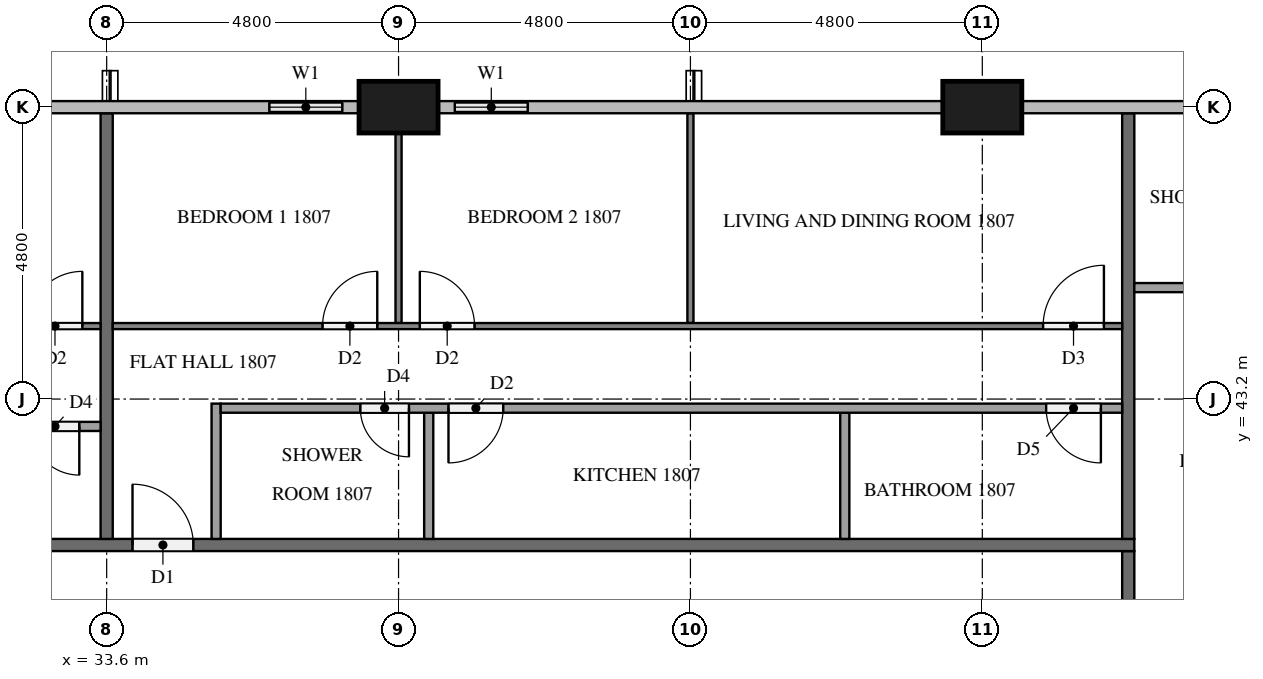
"""IFC4 building model, lengths in metres.
Left out: names, types, materials, properties, quantities, classifications, styles, units other than length and angle.
Written with IfcOpenShell. Run it as: python <this file> out.ifc"""

import sys

from ifc_helpers import new_model, si_unit, direction, frame, frame_2d, origin, origin_2d, place, context, subcontext, project, spatial, rectangle, extrude, element, fill, save


model = new_model("IFC4")
c1 = context("Model", 3, precision=1e-05, world=origin(), true_north=direction((0.0, 1.0)))
c2 = subcontext(c1, "Body", "Model", "MODEL_VIEW")
j1 = project(units=[si_unit("LENGTHUNIT", "METRE"), si_unit("PLANEANGLEUNIT", "RADIAN")], contexts=[c1])
p1 = place(None, origin())
s1 = spatial("IfcSite", under=j1, at=p1, CompositionType="ELEMENT")
p2 = place(p1, origin())
s2 = spatial("IfcBuilding", under=s1, at=p2, CompositionType="ELEMENT")
p3 = place(p2, frame((0.0, 0.0, 73.3)))
s3 = spatial("IfcBuildingStorey", under=s2, at=p3, CompositionType="ELEMENT", Elevation=73.3)
for number, where, z_axis, x_axis in (
    (1, (48.0, 48.0, 0.0), (0.0, 0.0, 1.0), (1.0, 0.0, 0.0)),
    (2, (38.4, 48.0, 0.0), (0.0, 0.0, 1.0), (1.0, 0.0, 0.0)),
):
    element("IfcColumn", number, at=place(p3, frame(where, z_axis=z_axis, x_axis=x_axis)), inside=s3, PredefinedType="COLUMN", context=c2, shape_type="SweptSolid", body=[
        extrude(rectangle(XDim=1.3, YDim=0.85, at=origin_2d()), origin(), (0.0, 0.0, 1.0), 3.2),
    ])
p4 = place(p3, frame((40.8, 48.0, 0.0), z_axis=(0.0, 0.0, 1.0), x_axis=(-1.0, 0.0, 0.0)))
e3 = element("IfcWall", 3, at=p4, inside=s3, PredefinedType="SOLIDWALL", context=c2, shape_type="SweptSolid", body=[
    extrude(rectangle(XDim=1.75, YDim=0.15, at=frame_2d((0.875, 0.0))), origin(), (0.0, 0.0, 1.0), 3.2),
])
p5 = place(p4, frame((0.275, 0.0, 0.9)))
e4 = element("IfcOpeningElement", 4, at=p5, cuts=e3, PredefinedType="OPENING", context=c2, shape_type="SweptSolid", body=[
    extrude(rectangle(XDim=1.2, YDim=1.4, at=frame_2d((0.6, 0.7))), frame((0.0, 0.085, 0.0), z_axis=(0.0, -1.0, 0.0), x_axis=(1.0, 0.0, 0.0)), (0.0, 0.0, 1.0), 0.17),
])
p6 = place(p3, frame((37.75, 48.0, 0.0), z_axis=(0.0, 0.0, 1.0), x_axis=(-1.0, 0.0, 0.0)))
e5 = element("IfcWall", 5, at=p6, inside=s3, PredefinedType="SOLIDWALL", context=c2, shape_type="SweptSolid", body=[
    extrude(rectangle(XDim=1.75, YDim=0.15, at=frame_2d((0.875, 0.0))), origin(), (0.0, 0.0, 1.0), 3.2),
])
p7 = place(p6, frame((0.275, 0.0, 0.9)))
e6 = element("IfcOpeningElement", 6, at=p7, cuts=e5, PredefinedType="OPENING", context=c2, shape_type="SweptSolid", body=[
    extrude(rectangle(XDim=1.2, YDim=1.4, at=frame_2d((0.6, 0.7))), frame((0.0, 0.085, 0.0), z_axis=(0.0, -1.0, 0.0), x_axis=(1.0, 0.0, 0.0)), (0.0, 0.0, 1.0), 0.17),
])
p8 = place(p3, frame((50.4, 40.7, 0.0), z_axis=(0.0, 0.0, 1.0), x_axis=(0.0, -1.0, 0.0)))
e7 = element("IfcWall", 7, at=p8, inside=s3, PredefinedType="PARTITIONING", context=c2, shape_type="SweptSolid", body=[
    extrude(rectangle(XDim=28.6, YDim=0.2, at=frame_2d((14.3, 0.0))), origin(), (0.0, 0.0, 1.0), 3.2),
])
p9 = place(p8, frame((21.875, 0.0, 0.0)))
e8 = element("IfcOpeningElement", 8, at=p9, cuts=e7, PredefinedType="OPENING", context=c2, shape_type="SweptSolid", body=[
    extrude(rectangle(XDim=1.1, YDim=2.1, at=frame_2d((0.55, 1.05))), frame((0.0, 0.11, 0.0), z_axis=(0.0, -1.0, 0.0), x_axis=(1.0, 0.0, 0.0)), (0.0, 0.0, 1.0), 0.22),
])
p10 = place(p8, frame((20.075, 0.0, 0.0)))
e9 = element("IfcOpeningElement", 9, at=p10, cuts=e7, PredefinedType="OPENING", context=c2, shape_type="SweptSolid", body=[
    extrude(rectangle(XDim=1.0, YDim=2.1, at=frame_2d((0.5, 1.05))), frame((0.0, 0.11, 0.0), z_axis=(0.0, -1.0, 0.0), x_axis=(1.0, 0.0, 0.0)), (0.0, 0.0, 1.0), 0.22),
])
p11 = place(p8, frame((5.675, 0.0, 0.0)))
e10 = element("IfcOpeningElement", 10, at=p11, cuts=e7, PredefinedType="OPENING", context=c2, shape_type="SweptSolid", body=[
    extrude(rectangle(XDim=1.0, YDim=2.1, at=frame_2d((0.5, 1.05))), frame((0.0, 0.11, 0.0), z_axis=(0.0, -1.0, 0.0), x_axis=(1.0, 0.0, 0.0)), (0.0, 0.0, 1.0), 0.22),
])
p12 = place(p3, frame((11.9, 40.8, 0.0), z_axis=(0.0, 0.0, 1.0), x_axis=(1.0, 0.0, 0.0)))
e11 = element("IfcWall", 11, at=p12, inside=s3, PredefinedType="PARTITIONING", context=c2, shape_type="SweptSolid", body=[
    extrude(rectangle(XDim=38.6, YDim=0.2, at=frame_2d((19.3, 0.0))), origin(), (0.0, 0.0, 1.0), 3.2),
])
p13 = place(p12, frame((22.125, 0.0, 0.0)))
e12 = element("IfcOpeningElement", 12, at=p13, cuts=e11, PredefinedType="OPENING", context=c2, shape_type="SweptSolid", body=[
    extrude(rectangle(XDim=1.0, YDim=2.1, at=frame_2d((0.5, 1.05))), frame((0.0, 0.11, 0.0), z_axis=(0.0, -1.0, 0.0), x_axis=(1.0, 0.0, 0.0)), (0.0, 0.0, 1.0), 0.22),
])
p14 = place(p12, frame((7.725, 0.0, 0.0)))
e13 = element("IfcOpeningElement", 13, at=p14, cuts=e11, PredefinedType="OPENING", context=c2, shape_type="SweptSolid", body=[
    extrude(rectangle(XDim=1.0, YDim=2.1, at=frame_2d((0.5, 1.05))), frame((0.0, 0.11, 0.0), z_axis=(0.0, -1.0, 0.0), x_axis=(1.0, 0.0, 0.0)), (0.0, 0.0, 1.0), 0.22),
])
p15 = place(p12, frame((5.875, 0.0, 0.0)))
e14 = element("IfcOpeningElement", 14, at=p15, cuts=e11, PredefinedType="OPENING", context=c2, shape_type="SweptSolid", body=[
    extrude(rectangle(XDim=1.0, YDim=2.1, at=frame_2d((0.5, 1.05))), frame((0.0, 0.11, 0.0), z_axis=(0.0, -1.0, 0.0), x_axis=(1.0, 0.0, 0.0)), (0.0, 0.0, 1.0), 0.22),
])
for number, where, z_axis, x_axis in (
    (15, (50.4, 40.9, 0.0), (0.0, 0.0, 1.0), (0.0, 1.0, 0.0)),
    (16, (33.6, 47.9, 0.0), (0.0, 0.0, 1.0), (0.0, -1.0, 0.0)),
):
    element("IfcWall", number, at=place(p3, frame(where, z_axis=z_axis, x_axis=x_axis)), inside=s3, PredefinedType="PARTITIONING", context=c2, shape_type="SweptSolid", body=[
        extrude(rectangle(XDim=7.0, YDim=0.2, at=frame_2d((3.5, 0.0))), origin(), (0.0, 0.0, 1.0), 3.2),
    ])
p16 = place(p3, frame((50.5, 45.033, 0.0), z_axis=(0.0, 0.0, 1.0), x_axis=(1.0, 0.0, 0.0)))
e17 = element("IfcWall", 17, at=p16, inside=s3, PredefinedType="PARTITIONING", context=c2, shape_type="SweptSolid", body=[
    extrude(rectangle(XDim=3.575, YDim=0.15, at=frame_2d((1.788, 0.0))), origin(), (0.0, 0.0, 1.0), 3.2),
])
p17 = place(p3, frame((38.4, 44.45, 0.0), z_axis=(0.0, 0.0, 1.0), x_axis=(0.0, 1.0, 0.0)))
e18 = element("IfcWall", 18, at=p17, inside=s3, PredefinedType="PARTITIONING", context=c2, shape_type="SweptSolid", body=[
    extrude(rectangle(XDim=3.125, YDim=0.1, at=frame_2d((1.562, 0.0))), origin(), (0.0, 0.0, 1.0), 3.2),
])
p18 = place(p3, frame((43.2, 44.45, 0.0), z_axis=(0.0, 0.0, 1.0), x_axis=(0.0, 1.0, 0.0)))
e19 = element("IfcWall", 19, at=p18, inside=s3, PredefinedType="PARTITIONING", context=c2, shape_type="SweptSolid", body=[
    extrude(rectangle(XDim=3.45, YDim=0.1, at=frame_2d((1.725, 0.0))), origin(), (0.0, 0.0, 1.0), 3.2),
])
p19 = place(p3, frame((33.7, 44.4, 0.0), z_axis=(0.0, 0.0, 1.0), x_axis=(1.0, 0.0, 0.0)))
e20 = element("IfcWall", 20, at=p19, inside=s3, PredefinedType="PARTITIONING", context=c2, shape_type="SweptSolid", body=[
    extrude(rectangle(XDim=16.6, YDim=0.1, at=frame_2d((8.3, 0.0))), origin(), (0.0, 0.0, 1.0), 3.2),
])
p20 = place(p19, frame((3.45, 0.0, 0.0)))
e21 = element("IfcOpeningElement", 21, at=p20, cuts=e20, PredefinedType="OPENING", context=c2, shape_type="SweptSolid", body=[
    extrude(rectangle(XDim=0.9, YDim=2.1, at=frame_2d((0.45, 1.05))), frame((0.0, 0.06, 0.0), z_axis=(0.0, -1.0, 0.0), x_axis=(1.0, 0.0, 0.0)), (0.0, 0.0, 1.0), 0.12),
])
p21 = place(p19, frame((5.05, 0.0, 0.0)))
e22 = element("IfcOpeningElement", 22, at=p21, cuts=e20, PredefinedType="OPENING", context=c2, shape_type="SweptSolid", body=[
    extrude(rectangle(XDim=0.9, YDim=2.1, at=frame_2d((0.45, 1.05))), frame((0.0, 0.06, 0.0), z_axis=(0.0, -1.0, 0.0), x_axis=(1.0, 0.0, 0.0)), (0.0, 0.0, 1.0), 0.12),
])
p22 = place(p19, frame((15.3, 0.0, 0.0)))
e23 = element("IfcOpeningElement", 23, at=p22, cuts=e20, PredefinedType="OPENING", context=c2, shape_type="SweptSolid", body=[
    extrude(rectangle(XDim=1.0, YDim=2.1, at=frame_2d((0.5, 1.05))), frame((0.0, 0.06, 0.0), z_axis=(0.0, -1.0, 0.0), x_axis=(1.0, 0.0, 0.0)), (0.0, 0.0, 1.0), 0.12),
])
for number, where, z_axis, x_axis in (
    (24, (38.896, 40.9, 0.0), (0.0, 0.0, 1.0), (0.0, 1.0, 0.0)),
    (25, (45.739, 40.9, 0.0), (0.0, 0.0, 1.0), (0.0, 1.0, 0.0)),
):
    element("IfcWall", number, at=place(p3, frame(where, z_axis=z_axis, x_axis=x_axis)), inside=s3, PredefinedType="PARTITIONING", context=c2, shape_type="SweptSolid", body=[
        extrude(rectangle(XDim=2.075, YDim=0.15, at=frame_2d((1.038, 0.0))), origin(), (0.0, 0.0, 1.0), 3.2),
    ])
p23 = place(p3, frame((35.4, 40.9, 0.0), z_axis=(0.0, 0.0, 1.0), x_axis=(0.0, 1.0, 0.0)))
e26 = element("IfcWall", 26, at=p23, inside=s3, PredefinedType="PARTITIONING", context=c2, shape_type="SweptSolid", body=[
    extrude(rectangle(XDim=2.225, YDim=0.15, at=frame_2d((1.113, 0.0))), origin(), (0.0, 0.0, 1.0), 3.2),
])
p24 = place(p3, frame((50.3, 43.05, 0.0), z_axis=(0.0, 0.0, 1.0), x_axis=(-1.0, 0.0, 0.0)))
e27 = element("IfcWall", 27, at=p24, inside=s3, PredefinedType="PARTITIONING", context=c2, shape_type="SweptSolid", body=[
    extrude(rectangle(XDim=14.825, YDim=0.15, at=frame_2d((7.413, 0.0))), origin(), (0.0, 0.0, 1.0), 3.2),
])
p25 = place(p24, frame((11.729, 0.0, 0.0)))
e28 = element("IfcOpeningElement", 28, at=p25, cuts=e27, PredefinedType="OPENING", context=c2, shape_type="SweptSolid", body=[
    extrude(rectangle(XDim=0.8, YDim=2.1, at=frame_2d((0.4, 1.05))), frame((0.0, 0.085, 0.0), z_axis=(0.0, -1.0, 0.0), x_axis=(1.0, 0.0, 0.0)), (0.0, 0.0, 1.0), 0.17),
])
p26 = place(p24, frame((10.179, 0.0, 0.0)))
e29 = element("IfcOpeningElement", 29, at=p26, cuts=e27, PredefinedType="OPENING", context=c2, shape_type="SweptSolid", body=[
    extrude(rectangle(XDim=0.9, YDim=2.1, at=frame_2d((0.45, 1.05))), frame((0.0, 0.085, 0.0), z_axis=(0.0, -1.0, 0.0), x_axis=(1.0, 0.0, 0.0)), (0.0, 0.0, 1.0), 0.17),
])
p27 = place(p24, frame((0.35, 0.0, 0.0)))
e30 = element("IfcOpeningElement", 30, at=p27, cuts=e27, PredefinedType="OPENING", context=c2, shape_type="SweptSolid", body=[
    extrude(rectangle(XDim=0.9, YDim=2.1, at=frame_2d((0.45, 1.05))), frame((0.0, 0.085, 0.0), z_axis=(0.0, -1.0, 0.0), x_axis=(1.0, 0.0, 0.0)), (0.0, 0.0, 1.0), 0.17),
])
p28 = place(p3, frame((19.3, 44.4, 0.0), z_axis=(0.0, 0.0, 1.0), x_axis=(1.0, 0.0, 0.0)))
e31 = element("IfcWall", 31, at=p28, inside=s3, PredefinedType="PARTITIONING", context=c2, shape_type="SweptSolid", body=[
    extrude(rectangle(XDim=14.2, YDim=0.1, at=frame_2d((7.1, 0.0))), origin(), (0.0, 0.0, 1.0), 3.2),
])
p29 = place(p28, frame((3.45, 0.0, 0.0)))
e32 = element("IfcOpeningElement", 32, at=p29, cuts=e31, PredefinedType="OPENING", context=c2, shape_type="SweptSolid", body=[
    extrude(rectangle(XDim=0.9, YDim=2.1, at=frame_2d((0.45, 1.05))), frame((0.0, 0.06, 0.0), z_axis=(0.0, -1.0, 0.0), x_axis=(1.0, 0.0, 0.0)), (0.0, 0.0, 1.0), 0.12),
])
p30 = place(p28, frame((5.05, 0.0, 0.0)))
e33 = element("IfcOpeningElement", 33, at=p30, cuts=e31, PredefinedType="OPENING", context=c2, shape_type="SweptSolid", body=[
    extrude(rectangle(XDim=1.0, YDim=2.1, at=frame_2d((0.5, 1.05))), frame((0.0, 0.06, 0.0), z_axis=(0.0, -1.0, 0.0), x_axis=(1.0, 0.0, 0.0)), (0.0, 0.0, 1.0), 0.12),
])
p31 = place(p28, frame((13.0, 0.0, 0.0)))
e34 = element("IfcOpeningElement", 34, at=p31, cuts=e31, PredefinedType="OPENING", context=c2, shape_type="SweptSolid", body=[
    extrude(rectangle(XDim=0.9, YDim=2.1, at=frame_2d((0.45, 1.05))), frame((0.0, 0.06, 0.0), z_axis=(0.0, -1.0, 0.0), x_axis=(1.0, 0.0, 0.0)), (0.0, 0.0, 1.0), 0.12),
])
p32 = place(p3, frame((33.5, 42.75, 0.0), z_axis=(0.0, 0.0, 1.0), x_axis=(-1.0, 0.0, 0.0)))
e35 = element("IfcWall", 35, at=p32, inside=s3, PredefinedType="PARTITIONING", context=c2, shape_type="SweptSolid", body=[
    extrude(rectangle(XDim=12.425, YDim=0.15, at=frame_2d((6.212, 0.0))), origin(), (0.0, 0.0, 1.0), 3.2),
])
p33 = place(p32, frame((8.927, 0.0, 0.0)))
e36 = element("IfcOpeningElement", 36, at=p33, cuts=e35, PredefinedType="OPENING", context=c2, shape_type="SweptSolid", body=[
    extrude(rectangle(XDim=0.9, YDim=2.1, at=frame_2d((0.45, 1.05))), frame((0.0, 0.085, 0.0), z_axis=(0.0, -1.0, 0.0), x_axis=(1.0, 0.0, 0.0)), (0.0, 0.0, 1.0), 0.17),
])
p34 = place(p32, frame((7.377, 0.0, 0.0)))
e37 = element("IfcOpeningElement", 37, at=p34, cuts=e35, PredefinedType="OPENING", context=c2, shape_type="SweptSolid", body=[
    extrude(rectangle(XDim=0.9, YDim=2.1, at=frame_2d((0.45, 1.05))), frame((0.0, 0.085, 0.0), z_axis=(0.0, -1.0, 0.0), x_axis=(1.0, 0.0, 0.0)), (0.0, 0.0, 1.0), 0.17),
])
p35 = place(p32, frame((0.35, 0.0, 0.0)))
e38 = element("IfcOpeningElement", 38, at=p35, cuts=e35, PredefinedType="OPENING", context=c2, shape_type="SweptSolid", body=[
    extrude(rectangle(XDim=0.8, YDim=2.1, at=frame_2d((0.4, 1.05))), frame((0.0, 0.085, 0.0), z_axis=(0.0, -1.0, 0.0), x_axis=(1.0, 0.0, 0.0)), (0.0, 0.0, 1.0), 0.17),
])
p36 = place(p5, origin())
e39 = element("IfcWindow", 39, at=p36, inside=s3, PartitioningType="SINGLE_PANEL", PredefinedType="WINDOW", context=c2, shape_type="SweptSolid", body=[
    extrude(rectangle(XDim=1.2, YDim=1.4, at=frame_2d((0.6, 0.7))), frame((0.0, 0.03, 0.0), z_axis=(0.0, -1.0, 0.0), x_axis=(1.0, 0.0, 0.0)), (0.0, 0.0, 1.0), 0.06),
])
fill(e4, e39)
p37 = place(p7, origin())
e40 = element("IfcWindow", 40, at=p37, inside=s3, PartitioningType="SINGLE_PANEL", PredefinedType="WINDOW", context=c2, shape_type="SweptSolid", body=[
    extrude(rectangle(XDim=1.2, YDim=1.4, at=frame_2d((0.6, 0.7))), frame((0.0, 0.03, 0.0), z_axis=(0.0, -1.0, 0.0), x_axis=(1.0, 0.0, 0.0)), (0.0, 0.0, 1.0), 0.06),
])
fill(e6, e40)
p38 = place(p13, origin())
e41 = element("IfcDoor", 41, at=p38, inside=s3, OperationType="SINGLE_SWING_LEFT", PredefinedType="DOOR", context=c2, shape_type="SweptSolid", body=[
    extrude(rectangle(XDim=1.0, YDim=2.1, at=frame_2d((0.5, 1.05))), frame((0.0, 0.025, 0.0), z_axis=(0.0, -1.0, 0.0), x_axis=(1.0, 0.0, 0.0)), (0.0, 0.0, 1.0), 0.05),
])
fill(e12, e41)
p39 = place(p20, origin())
e42 = element("IfcDoor", 42, at=p39, inside=s3, OperationType="SINGLE_SWING_RIGHT", PredefinedType="DOOR", context=c2, shape_type="SweptSolid", body=[
    extrude(rectangle(XDim=0.9, YDim=2.1, at=frame_2d((0.45, 1.05))), frame((0.0, 0.025, 0.0), z_axis=(0.0, -1.0, 0.0), x_axis=(1.0, 0.0, 0.0)), (0.0, 0.0, 1.0), 0.05),
])
fill(e21, e42)
p40 = place(p21, origin())
e43 = element("IfcDoor", 43, at=p40, inside=s3, OperationType="SINGLE_SWING_LEFT", PredefinedType="DOOR", context=c2, shape_type="SweptSolid", body=[
    extrude(rectangle(XDim=0.9, YDim=2.1, at=frame_2d((0.45, 1.05))), frame((0.0, 0.025, 0.0), z_axis=(0.0, -1.0, 0.0), x_axis=(1.0, 0.0, 0.0)), (0.0, 0.0, 1.0), 0.05),
])
fill(e22, e43)
p41 = place(p22, origin())
e44 = element("IfcDoor", 44, at=p41, inside=s3, OperationType="SINGLE_SWING_RIGHT", PredefinedType="DOOR", context=c2, shape_type="SweptSolid", body=[
    extrude(rectangle(XDim=1.0, YDim=2.1, at=frame_2d((0.5, 1.05))), frame((0.0, 0.025, 0.0), z_axis=(0.0, -1.0, 0.0), x_axis=(1.0, 0.0, 0.0)), (0.0, 0.0, 1.0), 0.05),
])
fill(e23, e44)
p42 = place(p25, origin())
e45 = element("IfcDoor", 45, at=p42, inside=s3, OperationType="SINGLE_SWING_LEFT", PredefinedType="DOOR", context=c2, shape_type="SweptSolid", body=[
    extrude(rectangle(XDim=0.8, YDim=2.1, at=frame_2d((0.4, 1.05))), frame((0.0, 0.025, 0.0), z_axis=(0.0, -1.0, 0.0), x_axis=(1.0, 0.0, 0.0)), (0.0, 0.0, 1.0), 0.05),
])
fill(e28, e45)
p43 = place(p26, origin())
e46 = element("IfcDoor", 46, at=p43, inside=s3, OperationType="SINGLE_SWING_RIGHT", PredefinedType="DOOR", context=c2, shape_type="SweptSolid", body=[
    extrude(rectangle(XDim=0.9, YDim=2.1, at=frame_2d((0.45, 1.05))), frame((0.0, 0.025, 0.0), z_axis=(0.0, -1.0, 0.0), x_axis=(1.0, 0.0, 0.0)), (0.0, 0.0, 1.0), 0.05),
])
fill(e29, e46)
p44 = place(p27, origin())
e47 = element("IfcDoor", 47, at=p44, inside=s3, OperationType="SINGLE_SWING_LEFT", PredefinedType="DOOR", context=c2, shape_type="SweptSolid", body=[
    extrude(rectangle(XDim=0.9, YDim=2.1, at=frame_2d((0.45, 1.05))), frame((0.0, 0.025, 0.0), z_axis=(0.0, -1.0, 0.0), x_axis=(1.0, 0.0, 0.0)), (0.0, 0.0, 1.0), 0.05),
])
fill(e30, e47)
p45 = place(p31, origin())
e48 = element("IfcDoor", 48, at=p45, inside=s3, OperationType="SINGLE_SWING_RIGHT", PredefinedType="DOOR", context=c2, shape_type="SweptSolid", body=[
    extrude(rectangle(XDim=0.9, YDim=2.1, at=frame_2d((0.45, 1.05))), frame((0.0, 0.025, 0.0), z_axis=(0.0, -1.0, 0.0), x_axis=(1.0, 0.0, 0.0)), (0.0, 0.0, 1.0), 0.05),
])
fill(e34, e48)
p46 = place(p35, origin())
e49 = element("IfcDoor", 49, at=p46, inside=s3, OperationType="SINGLE_SWING_LEFT", PredefinedType="DOOR", context=c2, shape_type="SweptSolid", body=[
    extrude(rectangle(XDim=0.8, YDim=2.1, at=frame_2d((0.4, 1.05))), frame((0.0, 0.025, 0.0), z_axis=(0.0, -1.0, 0.0), x_axis=(1.0, 0.0, 0.0)), (0.0, 0.0, 1.0), 0.05),
])
fill(e38, e49)
save(model, sys.argv[1])
